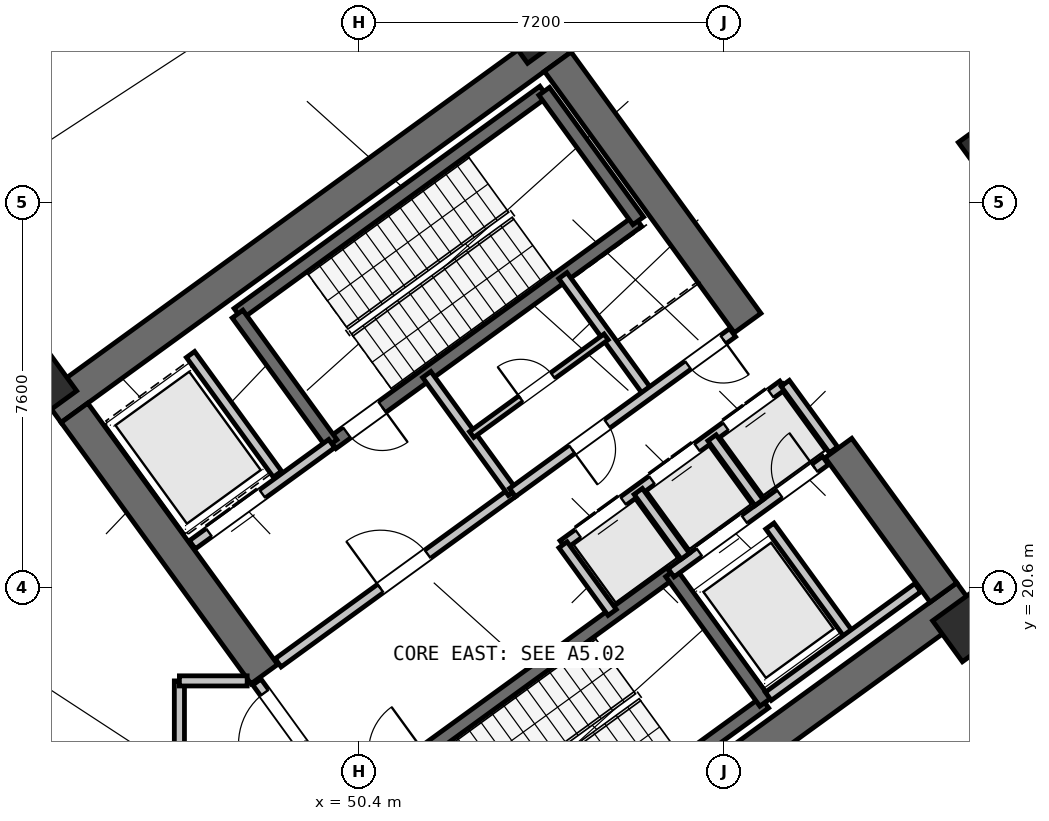
"""IFC4 building model, lengths in metres.
Left out: names, types, materials, properties, quantities, classifications, styles, units other than length and angle.
Written with IfcOpenShell. Run it as: python <this file> out.ifc"""

import sys

from ifc_helpers import new_model, si_unit, direction, frame, frame_2d, origin, origin_2d, place, context, subcontext, project, spatial, rectangle, hollow_rectangle, extrude, source, transform, mapped, element, fill, save


model = new_model("IFC4")
c1 = context("Model", 3, precision=1e-05, world=origin(), true_north=direction((0.0, 1.0)))
c2 = subcontext(c1, "Body", "Model", "MODEL_VIEW")
j1 = project(units=[si_unit("LENGTHUNIT", "METRE"), si_unit("PLANEANGLEUNIT", "RADIAN")], contexts=[c1])
p1 = place(None, origin())
s1 = spatial("IfcSite", under=j1, at=p1, CompositionType="ELEMENT")
p2 = place(p1, origin())
s2 = spatial("IfcBuilding", under=s1, at=p2, CompositionType="ELEMENT")
p3 = place(p2, origin())
s3 = spatial("IfcBuildingStorey", under=s2, at=p3, CompositionType="ELEMENT", Elevation=0.0)
p4 = place(p3, frame((52.318, 13.11, 0.0), z_axis=(0.0, 0.0, 1.0), x_axis=(0.809019445368, 0.587781878776, 0.0)))
e1 = element("IfcWall", 1, at=p4, inside=s3, PredefinedType="SHEAR", context=c2, shape_type="SweptSolid", body=[
    extrude(rectangle(XDim=12.44, YDim=0.65, at=frame_2d((6.22, 0.0))), origin(), (0.0, 0.0, 1.0), 5.05),
])
p5 = place(p3, frame((44.325, 24.113, 0.0), z_axis=(0.0, 0.0, 1.0), x_axis=(0.809012664862, 0.58779121131, 0.0)))
e2 = element("IfcWall", 2, at=p5, inside=s3, PredefinedType="SHEAR", context=c2, shape_type="SweptSolid", body=[
    extrude(rectangle(XDim=12.44, YDim=0.65, at=frame_2d((6.22, 0.0))), origin(), (0.0, 0.0, 1.0), 5.05),
])
p6 = place(p3, frame((48.526, 18.884, 0.0), z_axis=(0.0, 0.0, 1.0), x_axis=(-0.58777996584, 0.809020835181, 0.0)))
e3 = element("IfcWall", 3, at=p6, inside=s3, PredefinedType="SHEAR", context=c2, shape_type="SweptSolid", body=[
    extrude(rectangle(XDim=6.375, YDim=0.65, at=frame_2d((3.188, 0.0))), origin(), (0.0, 0.0, 1.0), 5.05),
])
p7 = place(p3, frame((61.929, 20.494, 0.0), z_axis=(0.0, 0.0, 1.0), x_axis=(-0.58782982593, 0.808984607855, 0.0)))
e4 = element("IfcWall", 4, at=p7, inside=s3, PredefinedType="SHEAR", context=c2, shape_type="SweptSolid", body=[
    extrude(rectangle(XDim=3.525, YDim=0.65, at=frame_2d((1.762, 0.0))), origin(), (0.0, 0.0, 1.0), 5.05),
])
p8 = place(p3, frame((58.064, 25.813, 0.0), z_axis=(0.0, 0.0, 1.0), x_axis=(-0.58777996584, 0.809020835181, 0.0)))
e5 = element("IfcWall", 5, at=p8, inside=s3, PredefinedType="SHEAR", context=c2, shape_type="SweptSolid", body=[
    extrude(rectangle(XDim=6.375, YDim=0.65, at=frame_2d((3.188, 0.0))), origin(), (0.0, 0.0, 1.0), 5.05),
])
m1 = source(origin(), c2, "Body", "SweptSolid", [
    extrude(hollow_rectangle(XDim=1.08, YDim=1.08, WallThickness=0.04, at=origin_2d()), origin(), (0.0, 0.0, 1.0), 5.4),
])
p9 = place(p3, frame((62.977, 29.259, 0.0), z_axis=(0.0, 0.0, 1.0), x_axis=(0.809016994375, 0.587785252292, 0.0)))
e6 = element("IfcColumn", 6, at=p9, inside=s3, PredefinedType="COLUMN", context=c2, shape_type="MappedRepresentation", body=[
    mapped(m1, transform((0.0, 0.0, 0.0), scale=1.0)),
])
m2 = source(origin(), c2, "Body", "SweptSolid", [
    extrude(hollow_rectangle(XDim=1.0, YDim=1.0, WallThickness=0.04, at=origin_2d()), origin(), (0.0, 0.0, 1.0), 5.4),
])
for number, where, z_axis, x_axis in (
    (7, (44.124, 24.585, 0.0), (0.0, 0.0, 1.0), (0.809, 0.588, 0.0)),
    (8, (62.414, 19.827, 0.0), (0.0, 0.0, 1.0), (0.809, 0.588, 0.0)),
    (9, (53.832, 31.638, 0.0), (0.0, 0.0, 1.0), (0.809, 0.588, 0.0)),
):
    element("IfcColumn", number, at=place(p3, frame(where, z_axis=z_axis, x_axis=x_axis)), inside=s3, PredefinedType="COLUMN", context=c2, shape_type="MappedRepresentation", body=[
        mapped(m2, transform((0.0, 0.0, 0.0), scale=1.0)),
    ])
p10 = place(p3, frame((48.006, 25.996, 0.0), z_axis=(0.0, 0.0, 1.0), x_axis=(0.80901903764, 0.587782439969, 0.0)))
e10 = element("IfcWall", 10, at=p10, inside=s3, PredefinedType="SHEAR", context=c2, shape_type="SweptSolid", body=[
    extrude(rectangle(XDim=7.46, YDim=0.26, at=frame_2d((3.73, 0.0))), origin(), (0.0, 0.0, 1.0), 5.05),
])
p11 = place(p3, frame((49.863, 23.44, 0.0), z_axis=(0.0, 0.0, 1.0), x_axis=(0.809003474932, 0.587803859759, 0.0)))
e11 = element("IfcWall", 11, at=p11, inside=s3, PredefinedType="SHEAR", context=c2, shape_type="SweptSolid", body=[
    extrude(rectangle(XDim=7.46, YDim=0.26, at=frame_2d((3.73, 0.0))), origin(), (0.0, 0.0, 1.0), 5.05),
])
p12 = place(p11, frame((0.36, 0.0, 0.0)))
e12 = element("IfcOpeningElement", 12, at=p12, cuts=e11, PredefinedType="OPENING", context=c2, shape_type="SweptSolid", body=[
    extrude(rectangle(XDim=0.86, YDim=2.05, at=frame_2d((0.43, 1.025))), frame((0.0, 0.14, 0.0), z_axis=(0.0, -1.0, 0.0), x_axis=(1.0, 0.0, 0.0)), (0.0, 0.0, 1.0), 0.28),
])
p13 = place(p3, frame((49.855, 23.434, 0.0), z_axis=(0.0, 0.0, 1.0), x_axis=(-0.58776738483, 0.809029975545, 0.0)))
e13 = element("IfcWall", 13, at=p13, inside=s3, PredefinedType="SHEAR", context=c2, shape_type="SweptSolid", body=[
    extrude(rectangle(XDim=3.16, YDim=0.26, at=frame_2d((1.58, 0.0))), origin(), (0.0, 0.0, 1.0), 5.05),
])
p14 = place(p3, frame((55.906, 27.831, 0.0), z_axis=(0.0, 0.0, 1.0), x_axis=(-0.587804123638, 0.809003283204, 0.0)))
e14 = element("IfcWall", 14, at=p14, inside=s3, PredefinedType="SHEAR", context=c2, shape_type="SweptSolid", body=[
    extrude(rectangle(XDim=3.16, YDim=0.26, at=frame_2d((1.58, 0.0))), origin(), (0.0, 0.0, 1.0), 5.05),
])
p15 = place(p3, frame((52.472, 14.013, 0.0), z_axis=(0.0, 0.0, 1.0), x_axis=(0.809028366311, 0.587769599847, 0.0)))
e15 = element("IfcWall", 15, at=p15, inside=s3, PredefinedType="SHEAR", context=c2, shape_type="SweptSolid", body=[
    extrude(rectangle(XDim=7.33, YDim=0.26, at=frame_2d((3.665, 0.0))), origin(), (0.0, 0.0, 1.0), 5.05),
])
p16 = place(p3, frame((50.615, 16.57, 0.0), z_axis=(0.0, 0.0, 1.0), x_axis=(0.809028366311, 0.587769599847, 0.0)))
e16 = element("IfcWall", 16, at=p16, inside=s3, PredefinedType="SHEAR", context=c2, shape_type="SweptSolid", body=[
    extrude(rectangle(XDim=7.33, YDim=0.26, at=frame_2d((3.665, 0.0))), origin(), (0.0, 0.0, 1.0), 5.05),
])
p17 = place(p16, frame((0.22, 0.0, 0.0)))
e17 = element("IfcOpeningElement", 17, at=p17, cuts=e16, PredefinedType="OPENING", context=c2, shape_type="SweptSolid", body=[
    extrude(rectangle(XDim=1.1, YDim=2.1, at=frame_2d((0.55, 1.05))), frame((0.0, 0.14, 0.0), z_axis=(0.0, -1.0, 0.0), x_axis=(1.0, 0.0, 0.0)), (0.0, 0.0, 1.0), 0.28),
])
p18 = place(p3, frame((58.41, 18.327, 0.0), z_axis=(0.0, 0.0, 1.0), x_axis=(-0.58776738483, 0.809029975545, 0.0)))
e18 = element("IfcWall", 18, at=p18, inside=s3, PredefinedType="SHEAR", context=c2, shape_type="SweptSolid", body=[
    extrude(rectangle(XDim=3.16, YDim=0.26, at=frame_2d((1.58, 0.0))), origin(), (0.0, 0.0, 1.0), 5.05),
])
p19 = place(p3, frame((47.106, 21.437, 0.0), z_axis=(0.0, 0.0, 1.0), x_axis=(0.809012514015, 0.58779141893, 0.0)))
e19 = element("IfcWall", 19, at=p19, inside=s3, PredefinedType="STANDARD", context=c2, shape_type="SweptSolid", body=[
    extrude(rectangle(XDim=3.398, YDim=0.2, at=frame_2d((1.699, 0.0))), origin(), (0.0, 0.0, 1.0), 5.04),
])
p20 = place(p19, frame((0.408, 0.0, 0.0)))
e20 = element("IfcOpeningElement", 20, at=p20, cuts=e19, PredefinedType="OPENING", context=c2, shape_type="SweptSolid", body=[
    extrude(rectangle(XDim=1.3, YDim=2.2, at=frame_2d((0.65, 1.1))), frame((0.0, 0.11, 0.0), z_axis=(0.0, -1.0, 0.0), x_axis=(1.0, 0.0, 0.0)), (0.0, 0.0, 1.0), 0.22),
])
p21 = place(p3, frame((48.799, 19.107, 0.0), z_axis=(0.0, 0.0, 1.0), x_axis=(0.809012959416, 0.587790805897, 0.0)))
e21 = element("IfcWall", 21, at=p21, inside=s3, PredefinedType="STANDARD", context=c2, shape_type="SweptSolid", body=[
    extrude(rectangle(XDim=5.718, YDim=0.2, at=frame_2d((2.859, 0.0))), origin(), (0.0, 0.0, 1.0), 5.04),
])
p22 = place(p21, frame((2.498, 0.0, 0.0)))
e22 = element("IfcOpeningElement", 22, at=p22, cuts=e21, PredefinedType="OPENING", context=c2, shape_type="SweptSolid", body=[
    extrude(rectangle(XDim=1.15, YDim=2.1, at=frame_2d((0.575, 1.05))), frame((0.0, 0.11, 0.0), z_axis=(0.0, -1.0, 0.0), x_axis=(1.0, 0.0, 0.0)), (0.0, 0.0, 1.0), 0.22),
])
p23 = place(p3, frame((56.553, 20.884, 0.0), z_axis=(0.0, 0.0, 1.0), x_axis=(0.809035789462, 0.587759382205, 0.0)))
e23 = element("IfcWall", 23, at=p23, inside=s3, PredefinedType="STANDARD", context=c2, shape_type="SweptSolid", body=[
    extrude(rectangle(XDim=3.768, YDim=0.2, at=frame_2d((1.884, 0.0))), origin(), (0.0, 0.0, 1.0), 5.04),
])
p24 = place(p23, frame((0.69, 0.0, 0.0)))
e24 = element("IfcOpeningElement", 24, at=p24, cuts=e23, PredefinedType="OPENING", context=c2, shape_type="SweptSolid", body=[
    extrude(rectangle(XDim=1.1, YDim=2.15, at=frame_2d((0.55, 1.075))), frame((0.0, 0.11, 0.0), z_axis=(0.0, -1.0, 0.0), x_axis=(1.0, 0.0, 0.0)), (0.0, 0.0, 1.0), 0.22),
])
p25 = place(p23, frame((2.65, 0.0, 0.0)))
e25 = element("IfcOpeningElement", 25, at=p25, cuts=e23, PredefinedType="OPENING", context=c2, shape_type="SweptSolid", body=[
    extrude(rectangle(XDim=0.86, YDim=2.05, at=frame_2d((0.43, 1.025))), frame((0.0, 0.11, 0.0), z_axis=(0.0, -1.0, 0.0), x_axis=(1.0, 0.0, 0.0)), (0.0, 0.0, 1.0), 0.22),
])
p26 = place(p3, frame((54.421, 21.436, 0.0), z_axis=(0.0, 0.0, 1.0), x_axis=(0.809013710463, 0.587789772183, 0.0)))
e26 = element("IfcWall", 26, at=p26, inside=s3, PredefinedType="STANDARD", context=c2, shape_type="SweptSolid", body=[
    extrude(rectangle(XDim=5.36, YDim=0.2, at=frame_2d((2.68, 0.0))), origin(), (0.0, 0.0, 1.0), 5.04),
])
p27 = place(p26, frame((0.37, 0.0, 0.0)))
e27 = element("IfcOpeningElement", 27, at=p27, cuts=e26, PredefinedType="OPENING", context=c2, shape_type="SweptSolid", body=[
    extrude(rectangle(XDim=1.1, YDim=2.15, at=frame_2d((0.55, 1.075))), frame((0.0, 0.11, 0.0), z_axis=(0.0, -1.0, 0.0), x_axis=(1.0, 0.0, 0.0)), (0.0, 0.0, 1.0), 0.22),
])
p28 = place(p26, frame((2.17, 0.0, 0.0)))
e28 = element("IfcOpeningElement", 28, at=p28, cuts=e26, PredefinedType="OPENING", context=c2, shape_type="SweptSolid", body=[
    extrude(rectangle(XDim=1.1, YDim=2.15, at=frame_2d((0.55, 1.075))), frame((0.0, 0.11, 0.0), z_axis=(0.0, -1.0, 0.0), x_axis=(1.0, 0.0, 0.0)), (0.0, 0.0, 1.0), 0.22),
])
p29 = place(p26, frame((3.97, 0.0, 0.0)))
e29 = element("IfcOpeningElement", 29, at=p29, cuts=e26, PredefinedType="OPENING", context=c2, shape_type="SweptSolid", body=[
    extrude(rectangle(XDim=1.1, YDim=2.15, at=frame_2d((0.55, 1.075))), frame((0.0, 0.11, 0.0), z_axis=(0.0, -1.0, 0.0), x_axis=(1.0, 0.0, 0.0)), (0.0, 0.0, 1.0), 0.22),
])
p30 = place(p3, frame((55.391, 20.102, 0.0), z_axis=(0.0, 0.0, 1.0), x_axis=(-0.58778447739, 0.809017557374, 0.0)))
e30 = element("IfcWall", 30, at=p30, inside=s3, PredefinedType="STANDARD", context=c2, shape_type="SweptSolid", body=[
    extrude(rectangle(XDim=1.65, YDim=0.2, at=frame_2d((0.825, 0.0))), origin(), (0.0, 0.0, 1.0), 5.04),
])
p31 = place(p3, frame((48.786, 22.83, 0.0), z_axis=(0.0, 0.0, 1.0), x_axis=(-0.587783856777, 0.809018008275, 0.0)))
e31 = element("IfcWall", 31, at=p31, inside=s3, PredefinedType="STANDARD", context=c2, shape_type="SweptSolid", body=[
    extrude(rectangle(XDim=2.92, YDim=0.2, at=frame_2d((1.46, 0.0))), origin(), (0.0, 0.0, 1.0), 5.04),
])
p32 = place(p3, frame((56.834, 21.212, 0.0), z_axis=(0.0, 0.0, 1.0), x_axis=(-0.58776738483, 0.809029975545, 0.0)))
e32 = element("IfcWall", 32, at=p32, inside=s3, PredefinedType="STANDARD", context=c2, shape_type="SweptSolid", body=[
    extrude(rectangle(XDim=1.58, YDim=0.2, at=frame_2d((0.79, 0.0))), origin(), (0.0, 0.0, 1.0), 5.04),
])
p33 = place(p3, frame((58.29, 22.27, 0.0), z_axis=(0.0, 0.0, 1.0), x_axis=(-0.587840865826, 0.808976585857, 0.0)))
e33 = element("IfcWall", 33, at=p33, inside=s3, PredefinedType="STANDARD", context=c2, shape_type="SweptSolid", body=[
    extrude(rectangle(XDim=1.58, YDim=0.2, at=frame_2d((0.79, 0.0))), origin(), (0.0, 0.0, 1.0), 5.04),
])
p34 = place(p3, frame((59.758, 23.312, 0.0), z_axis=(0.0, 0.0, 1.0), x_axis=(-0.587875962906, 0.808951081486, 0.0)))
e34 = element("IfcWall", 34, at=p34, inside=s3, PredefinedType="STANDARD", context=c2, shape_type="SweptSolid", body=[
    extrude(rectangle(XDim=1.62, YDim=0.2, at=frame_2d((0.81, 0.0))), origin(), (0.0, 0.0, 1.0), 5.04),
])
p35 = place(p3, frame((60.067, 19.655, 0.0), z_axis=(0.0, 0.0, 1.0), x_axis=(-0.587800520745, 0.809005900975, 0.0)))
e35 = element("IfcWall", 35, at=p35, inside=s3, PredefinedType="STANDARD", context=c2, shape_type="SweptSolid", body=[
    extrude(rectangle(XDim=2.66, YDim=0.2, at=frame_2d((1.33, 0.0))), origin(), (0.0, 0.0, 1.0), 5.04),
])
p36 = place(p3, frame((58.472, 18.447, 0.0), z_axis=(0.0, 0.0, 1.0), x_axis=(0.809022487728, 0.587777691266, 0.0)))
e36 = element("IfcWall", 36, at=p36, inside=s3, PredefinedType="STANDARD", context=c2, shape_type="SweptSolid", body=[
    extrude(rectangle(XDim=3.648, YDim=0.2, at=frame_2d((1.824, 0.0))), origin(), (0.0, 0.0, 1.0), 5.04),
])
p37 = place(p3, frame((53.425, 22.468, 0.0), z_axis=(0.0, 0.0, 1.0), x_axis=(-0.5877230039, 0.809062216821, 0.0)))
e37 = element("IfcWall", 37, at=p37, inside=s3, PredefinedType="STANDARD", context=c2, shape_type="SweptSolid", body=[
    extrude(rectangle(XDim=2.88, YDim=0.2, at=frame_2d((1.44, 0.0))), origin(), (0.0, 0.0, 1.0), 5.04),
])
p38 = place(p3, frame((56.111, 24.419, 0.0), z_axis=(0.0, 0.0, 1.0), x_axis=(-0.58777848983, 0.809021907548, 0.0)))
e38 = element("IfcWall", 38, at=p38, inside=s3, PredefinedType="STANDARD", context=c2, shape_type="SweptSolid", body=[
    extrude(rectangle(XDim=2.88, YDim=0.2, at=frame_2d((1.44, 0.0))), origin(), (0.0, 0.0, 1.0), 5.04),
])
p39 = place(p3, frame((53.425, 22.468, 0.0), z_axis=(0.0, 0.0, 1.0), x_axis=(0.80902705128, 0.587771409902, 0.0)))
e39 = element("IfcWall", 39, at=p39, inside=s3, PredefinedType="STANDARD", context=c2, shape_type="SweptSolid", body=[
    extrude(rectangle(XDim=5.368, YDim=0.2, at=frame_2d((2.684, 0.0))), origin(), (0.0, 0.0, 1.0), 5.04),
])
p40 = place(p39, frame((4.28, 0.0, 0.0)))
e40 = element("IfcOpeningElement", 40, at=p40, cuts=e39, PredefinedType="OPENING", context=c2, shape_type="SweptSolid", body=[
    extrude(rectangle(XDim=0.86, YDim=2.05, at=frame_2d((0.43, 1.025))), frame((0.0, 0.11, 0.0), z_axis=(0.0, -1.0, 0.0), x_axis=(1.0, 0.0, 0.0)), (0.0, 0.0, 1.0), 0.22),
])
p41 = place(p39, frame((1.45, 0.0, 0.0)))
e41 = element("IfcOpeningElement", 41, at=p41, cuts=e39, PredefinedType="OPENING", context=c2, shape_type="SweptSolid", body=[
    extrude(rectangle(XDim=0.86, YDim=2.05, at=frame_2d((0.43, 1.025))), frame((0.0, 0.11, 0.0), z_axis=(0.0, -1.0, 0.0), x_axis=(1.0, 0.0, 0.0)), (0.0, 0.0, 1.0), 0.22),
])
p42 = place(p3, frame((52.618, 23.612, 0.0), z_axis=(0.0, 0.0, 1.0), x_axis=(0.809009587469, 0.587795446889, 0.0)))
e42 = element("IfcWall", 42, at=p42, inside=s3, PredefinedType="PLUMBINGWALL", context=c2, shape_type="SweptSolid", body=[
    extrude(rectangle(XDim=3.28, YDim=0.14, at=frame_2d((1.64, 0.0))), origin(), (0.0, 0.0, 1.0), 5.04),
])
p43 = place(p42, frame((1.2, 0.0, 0.0)))
e43 = element("IfcOpeningElement", 43, at=p43, cuts=e42, PredefinedType="OPENING", context=c2, shape_type="SweptSolid", body=[
    extrude(rectangle(XDim=0.78, YDim=2.05, at=frame_2d((0.39, 1.025))), frame((0.0, 0.08, 0.0), z_axis=(0.0, -1.0, 0.0), x_axis=(1.0, 0.0, 0.0)), (0.0, 0.0, 1.0), 0.16),
])
p44 = place(p3, frame((46.85, 1.6, 0.0), z_axis=(0.0, 0.0, 1.0), x_axis=(0.0, 1.0, 0.0)))
e44 = element("IfcWall", 44, at=p44, inside=s3, PredefinedType="STANDARD", context=c2, shape_type="SweptSolid", body=[
    extrude(rectangle(XDim=17.15, YDim=0.2, at=frame_2d((8.575, 0.0))), origin(), (0.0, 0.0, 1.0), 5.04),
])
p45 = place(p44, frame((5.2, 0.0, 0.0)))
e45 = element("IfcOpeningElement", 45, at=p45, cuts=e44, PredefinedType="OPENING", context=c2, shape_type="SweptSolid", body=[
    extrude(rectangle(XDim=1.25, YDim=2.15, at=frame_2d((0.625, 1.075))), frame((0.0, 0.11, 0.0), z_axis=(0.0, -1.0, 0.0), x_axis=(1.0, 0.0, 0.0)), (0.0, 0.0, 1.0), 0.22),
])
p46 = place(p3, frame((46.85, 18.75, 0.0), z_axis=(0.0, 0.0, 1.0), x_axis=(1.0, 0.0, 0.0)))
e46 = element("IfcWall", 46, at=p46, inside=s3, PredefinedType="STANDARD", context=c2, shape_type="SweptSolid", body=[
    extrude(rectangle(XDim=1.338, YDim=0.2, at=frame_2d((0.669, 0.0))), origin(), (0.0, 0.0, 1.0), 5.04),
])
p47 = place(p3, frame((50.119, 16.333, 0.0), z_axis=(0.0, 0.0, 1.0), x_axis=(-0.587749856981, 0.809042709391, 0.0)))
e47 = element("IfcWall", 47, at=p47, inside=s3, PredefinedType="STANDARD", context=c2, shape_type="SweptSolid", body=[
    extrude(rectangle(XDim=2.96, YDim=0.2, at=frame_2d((1.48, 0.0))), origin(), (0.0, 0.0, 1.0), 5.04),
])
p48 = place(p47, frame((1.45, 0.0, 0.0)))
e48 = element("IfcOpeningElement", 48, at=p48, cuts=e47, PredefinedType="OPENING", context=c2, shape_type="SweptSolid", body=[
    extrude(rectangle(XDim=1.25, YDim=2.15, at=frame_2d((0.625, 1.075))), frame((0.0, 0.11, 0.0), z_axis=(0.0, -1.0, 0.0), x_axis=(1.0, 0.0, 0.0)), (0.0, 0.0, 1.0), 0.22),
])
m3 = source(origin(), c2, "Body", "SweptSolid", [
    extrude(rectangle(XDim=0.86, YDim=2.05, at=frame_2d((0.43, 1.025))), frame((0.0, 0.025, 0.0), z_axis=(0.0, -1.0, 0.0), x_axis=(1.0, 0.0, 0.0)), (0.0, 0.0, 1.0), 0.05),
])
p49 = place(p12, frame((0.86, 0.0, 0.0), z_axis=(0.0, 0.0, 1.0), x_axis=(-1.0, 0.0, 0.0)))
e49 = element("IfcDoor", 49, at=p49, inside=s3, OperationType="SINGLE_SWING_LEFT", PredefinedType="DOOR", context=c2, shape_type="MappedRepresentation", body=[
    mapped(m3, transform((0.0, 0.0, 0.0), scale=1.0)),
])
fill(e12, e49)
m4 = source(origin(), c2, "Body", "SweptSolid", [
    extrude(rectangle(XDim=1.15, YDim=2.1, at=frame_2d((0.575, 1.05))), frame((0.0, 0.025, 0.0), z_axis=(0.0, -1.0, 0.0), x_axis=(1.0, 0.0, 0.0)), (0.0, 0.0, 1.0), 0.05),
])
p50 = place(p22, origin())
e50 = element("IfcDoor", 50, at=p50, inside=s3, OperationType="SINGLE_SWING_LEFT", PredefinedType="DOOR", context=c2, shape_type="MappedRepresentation", body=[
    mapped(m4, transform((0.0, 0.0, 0.0), scale=1.0)),
])
fill(e22, e50)
m5 = source(origin(), c2, "Body", "SweptSolid", [
    extrude(rectangle(XDim=1.3, YDim=2.2, at=frame_2d((0.65, 1.1))), frame((0.0, 0.025, 0.0), z_axis=(0.0, -1.0, 0.0), x_axis=(1.0, 0.0, 0.0)), (0.0, 0.0, 1.0), 0.05),
])
p51 = place(p20, origin())
e51 = element("IfcDoor", 51, at=p51, inside=s3, OperationType="DOUBLE_DOOR_SLIDING", PredefinedType="DOOR", context=c2, shape_type="MappedRepresentation", body=[
    mapped(m5, transform((0.0, 0.0, 0.0), scale=1.0)),
])
fill(e20, e51)
m6 = source(origin(), c2, "Body", "SweptSolid", [
    extrude(rectangle(XDim=1.1, YDim=2.15, at=frame_2d((0.55, 1.075))), frame((0.0, 0.025, 0.0), z_axis=(0.0, -1.0, 0.0), x_axis=(1.0, 0.0, 0.0)), (0.0, 0.0, 1.0), 0.05),
])
p52 = place(p27, origin())
e52 = element("IfcDoor", 52, at=p52, inside=s3, OperationType="DOUBLE_DOOR_SLIDING", PredefinedType="DOOR", context=c2, shape_type="MappedRepresentation", body=[
    mapped(m6, transform((0.0, 0.0, 0.0), scale=1.0)),
])
fill(e27, e52)
p53 = place(p28, origin())
e53 = element("IfcDoor", 53, at=p53, inside=s3, OperationType="DOUBLE_DOOR_SLIDING", PredefinedType="DOOR", context=c2, shape_type="MappedRepresentation", body=[
    mapped(m6, transform((0.0, 0.0, 0.0), scale=1.0)),
])
fill(e28, e53)
p54 = place(p29, origin())
e54 = element("IfcDoor", 54, at=p54, inside=s3, OperationType="DOUBLE_DOOR_SLIDING", PredefinedType="DOOR", context=c2, shape_type="MappedRepresentation", body=[
    mapped(m6, transform((0.0, 0.0, 0.0), scale=1.0)),
])
fill(e29, e54)
p55 = place(p24, origin())
e55 = element("IfcDoor", 55, at=p55, inside=s3, OperationType="DOUBLE_DOOR_SLIDING", PredefinedType="DOOR", context=c2, shape_type="MappedRepresentation", body=[
    mapped(m6, transform((0.0, 0.0, 0.0), scale=1.0)),
])
fill(e24, e55)
p56 = place(p25, origin())
e56 = element("IfcDoor", 56, at=p56, inside=s3, OperationType="SINGLE_SWING_RIGHT", PredefinedType="DOOR", context=c2, shape_type="MappedRepresentation", body=[
    mapped(m3, transform((0.0, 0.0, 0.0), scale=1.0)),
])
fill(e25, e56)
p57 = place(p40, frame((0.86, 0.0, 0.0), z_axis=(0.0, 0.0, 1.0), x_axis=(-1.0, 0.0, 0.0)))
e57 = element("IfcDoor", 57, at=p57, inside=s3, OperationType="SINGLE_SWING_LEFT", PredefinedType="DOOR", context=c2, shape_type="MappedRepresentation", body=[
    mapped(m3, transform((0.0, 0.0, 0.0), scale=1.0)),
])
fill(e40, e57)
p58 = place(p41, frame((0.86, 0.0, 0.0), z_axis=(0.0, 0.0, 1.0), x_axis=(-1.0, 0.0, 0.0)))
e58 = element("IfcDoor", 58, at=p58, inside=s3, OperationType="SINGLE_SWING_RIGHT", PredefinedType="DOOR", context=c2, shape_type="MappedRepresentation", body=[
    mapped(m3, transform((0.0, 0.0, 0.0), scale=1.0)),
])
fill(e41, e58)
m7 = source(origin(), c2, "Body", "SweptSolid", [
    extrude(rectangle(XDim=0.78, YDim=2.05, at=frame_2d((0.39, 1.025))), frame((0.0, 0.025, 0.0), z_axis=(0.0, -1.0, 0.0), x_axis=(1.0, 0.0, 0.0)), (0.0, 0.0, 1.0), 0.05),
])
p59 = place(p43, origin())
e59 = element("IfcDoor", 59, at=p59, inside=s3, OperationType="SINGLE_SWING_LEFT", PredefinedType="DOOR", context=c2, shape_type="MappedRepresentation", body=[
    mapped(m7, transform((0.0, 0.0, 0.0), scale=1.0)),
])
fill(e43, e59)
m8 = source(origin(), c2, "Body", "SweptSolid", [
    extrude(rectangle(XDim=1.25, YDim=2.15, at=frame_2d((0.625, 1.075))), frame((0.0, 0.025, 0.0), z_axis=(0.0, -1.0, 0.0), x_axis=(1.0, 0.0, 0.0)), (0.0, 0.0, 1.0), 0.05),
])
p60 = place(p48, origin())
e60 = element("IfcDoor", 60, at=p60, inside=s3, OperationType="SINGLE_SWING_LEFT", PredefinedType="DOOR", context=c2, shape_type="MappedRepresentation", body=[
    mapped(m8, transform((0.0, 0.0, 0.0), scale=1.0)),
])
fill(e48, e60)
save(model, sys.argv[1])
